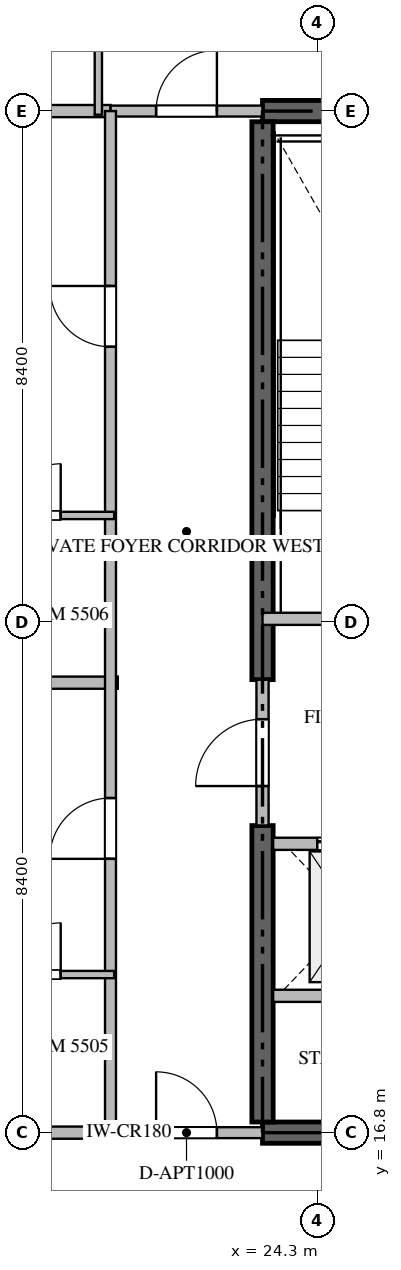
"""IFC4 building model, lengths in metres.
Left out: names, types, materials, properties, quantities, classifications, styles, units other than length and angle.
Written with IfcOpenShell. Run it as: python <this file> out.ifc"""

import sys

from ifc_helpers import new_model, si_unit, direction, frame, frame_2d, origin, place, context, subcontext, project, spatial, rectangle, extrude, source, transform, mapped, element, fill, save


model = new_model("IFC4")
c1 = context("Model", 3, precision=1e-05, world=origin(), true_north=direction((0.0, 1.0)))
c2 = subcontext(c1, "Body", "Model", "MODEL_VIEW")
j1 = project(units=[si_unit("LENGTHUNIT", "METRE"), si_unit("PLANEANGLEUNIT", "RADIAN")], contexts=[c1])
p1 = place(None, origin())
s1 = spatial("IfcSite", under=j1, at=p1, CompositionType="ELEMENT")
p2 = place(p1, origin())
s2 = spatial("IfcBuilding", under=s1, at=p2, CompositionType="ELEMENT")
p3 = place(p2, frame((0.0, 0.0, 222.0)))
s3 = spatial("IfcBuildingStorey", under=s2, at=p3, CompositionType="ELEMENT", Elevation=222.0)
for number, where, z_axis, x_axis in (
    (1, (23.4, 16.8, -0.26), (0.0, 0.0, 1.0), (1.0, 0.0, 0.0)),
    (2, (41.4, 33.6, -0.26), (0.0, 0.0, 1.0), (-1.0, 0.0, 0.0)),
):
    element("IfcWall", number, at=place(p3, frame(where, z_axis=z_axis, x_axis=x_axis)), inside=s3, PredefinedType="SHEAR", context=c2, shape_type="SweptSolid", body=[
        extrude(rectangle(XDim=18.0, YDim=0.35, at=frame_2d((9.0, 0.0))), origin(), (0.0, 0.0, 1.0), 3.848),
    ])
p4 = place(p3, frame((23.4, 16.975, -0.26), z_axis=(0.0, 0.0, 1.0), x_axis=(0.0, 1.0, 0.0)))
e3 = element("IfcWall", 3, at=p4, inside=s3, PredefinedType="SHEAR", context=c2, shape_type="SweptSolid", body=[
    extrude(rectangle(XDim=4.875, YDim=0.35, at=frame_2d((2.438, 0.0))), origin(), (0.0, 0.0, 1.0), 3.848),
])
p5 = place(p3, frame((23.4, 24.25, -0.26), z_axis=(0.0, 0.0, 1.0), x_axis=(0.0, 1.0, 0.0)))
e4 = element("IfcWall", 4, at=p5, inside=s3, PredefinedType="SHEAR", context=c2, shape_type="SweptSolid", body=[
    extrude(rectangle(XDim=9.175, YDim=0.35, at=frame_2d((4.587, 0.0))), origin(), (0.0, 0.0, 1.0), 3.848),
])
p6 = place(p3, frame((23.4, 25.25, 0.0), z_axis=(0.0, 0.0, 1.0), x_axis=(1.0, 0.0, 0.0)))
e5 = element("IfcWall", 5, at=p6, inside=s3, PredefinedType="STANDARD", context=c2, shape_type="SweptSolid", body=[
    extrude(rectangle(XDim=4.45, YDim=0.2, at=frame_2d((2.225, 0.0))), origin(), (0.0, 0.0, 1.0), 3.59),
])
p7 = place(p6, frame((1.65, 0.0, 0.0)))
e6 = element("IfcOpeningElement", 6, at=p7, cuts=e5, PredefinedType="OPENING", context=c2, shape_type="SweptSolid", body=[
    extrude(rectangle(XDim=1.1, YDim=2.15, at=frame_2d((0.55, 1.075))), frame((0.0, 0.11, 0.0), z_axis=(0.0, -1.0, 0.0), x_axis=(1.0, 0.0, 0.0)), (0.0, 0.0, 1.0), 0.22),
])
p8 = place(p3, frame((23.575, 21.55, 0.0), z_axis=(0.0, 0.0, 1.0), x_axis=(1.0, 0.0, 0.0)))
e7 = element("IfcWall", 7, at=p8, inside=s3, PredefinedType="STANDARD", context=c2, shape_type="SweptSolid", body=[
    extrude(rectangle(XDim=2.475, YDim=0.2, at=frame_2d((1.238, 0.0))), origin(), (0.0, 0.0, 1.0), 3.59),
])
p9 = place(p8, frame((0.725, 0.0, 0.0)))
e8 = element("IfcOpeningElement", 8, at=p9, cuts=e7, PredefinedType="OPENING", context=c2, shape_type="SweptSolid", body=[
    extrude(rectangle(XDim=1.2, YDim=2.2, at=frame_2d((0.6, 1.1))), frame((0.0, 0.11, 0.0), z_axis=(0.0, -1.0, 0.0), x_axis=(1.0, 0.0, 0.0)), (0.0, 0.0, 1.0), 0.22),
])
p10 = place(p3, frame((23.575, 19.05, 0.0), z_axis=(0.0, 0.0, 1.0), x_axis=(1.0, 0.0, 0.0)))
e9 = element("IfcWall", 9, at=p10, inside=s3, PredefinedType="STANDARD", context=c2, shape_type="SweptSolid", body=[
    extrude(rectangle(XDim=2.475, YDim=0.2, at=frame_2d((1.238, 0.0))), origin(), (0.0, 0.0, 1.0), 3.59),
])
p11 = place(p3, frame((23.4, 21.852, 0.0), z_axis=(0.0, 0.0, 1.0), x_axis=(0.0, 1.0, 0.0)))
e10 = element("IfcWall", 10, at=p11, inside=s3, PredefinedType="STANDARD", context=c2, shape_type="SweptSolid", body=[
    extrude(rectangle(XDim=2.396, YDim=0.2, at=frame_2d((1.198, 0.0))), origin(), (0.0, 0.0, 1.0), 3.59),
])
p12 = place(p11, frame((0.648, 0.0, 0.0)))
e11 = element("IfcOpeningElement", 11, at=p12, cuts=e10, PredefinedType="OPENING", context=c2, shape_type="SweptSolid", body=[
    extrude(rectangle(XDim=1.1, YDim=2.15, at=frame_2d((0.55, 1.075))), frame((0.0, 0.11, 0.0), z_axis=(0.0, -1.0, 0.0), x_axis=(1.0, 0.0, 0.0)), (0.0, 0.0, 1.0), 0.22),
])
p13 = place(p3, frame((7.482, 24.2, 0.0), z_axis=(0.0, 0.0, 1.0), x_axis=(1.0, 0.0, 0.0)))
e12 = element("IfcWall", 12, at=p13, inside=s3, PredefinedType="PARTITIONING", context=c2, shape_type="SweptSolid", body=[
    extrude(rectangle(XDim=13.538, YDim=0.2, at=frame_2d((6.769, 0.0))), origin(), (0.0, 0.0, 1.0), 3.59),
])
for number, where, z_axis, x_axis in (
    (13, (7.482, 16.8, 0.0), (0.0, 0.0, 1.0), (1.0, 0.0, 0.0)),
    (14, (7.482, 33.6, 0.0), (0.0, 0.0, 1.0), (1.0, 0.0, 0.0)),
):
    element("IfcWall", number, at=place(p3, frame(where, z_axis=z_axis, x_axis=x_axis)), inside=s3, PredefinedType="PARTITIONING", context=c2, shape_type="SweptSolid", body=[
        extrude(rectangle(XDim=13.418, YDim=0.2, at=frame_2d((6.709, 0.0))), origin(), (0.0, 0.0, 1.0), 3.59),
    ])
p14 = place(p3, frame((20.902, 16.8, 0.0), z_axis=(0.0, 0.0, 1.0), x_axis=(1.0, 0.0, 0.0)))
e15 = element("IfcWall", 15, at=p14, inside=s3, PredefinedType="PARTITIONING", context=c2, shape_type="SweptSolid", body=[
    extrude(rectangle(XDim=2.496, YDim=0.18, at=frame_2d((1.248, 0.0))), origin(), (0.0, 0.0, 1.0), 3.59),
])
p15 = place(p14, frame((0.748, 0.0, 0.0)))
e16 = element("IfcOpeningElement", 16, at=p15, cuts=e15, PredefinedType="OPENING", context=c2, shape_type="SweptSolid", body=[
    extrude(rectangle(XDim=1.0, YDim=2.15, at=frame_2d((0.5, 1.075))), frame((0.0, 0.1, 0.0), z_axis=(0.0, -1.0, 0.0), x_axis=(1.0, 0.0, 0.0)), (0.0, 0.0, 1.0), 0.2),
])
p16 = place(p3, frame((20.902, 33.6, 0.0), z_axis=(0.0, 0.0, 1.0), x_axis=(1.0, 0.0, 0.0)))
e17 = element("IfcWall", 17, at=p16, inside=s3, PredefinedType="PARTITIONING", context=c2, shape_type="SweptSolid", body=[
    extrude(rectangle(XDim=2.496, YDim=0.18, at=frame_2d((1.248, 0.0))), origin(), (0.0, 0.0, 1.0), 3.59),
])
p17 = place(p16, frame((0.748, 0.0, 0.0)))
e18 = element("IfcOpeningElement", 18, at=p17, cuts=e17, PredefinedType="OPENING", context=c2, shape_type="SweptSolid", body=[
    extrude(rectangle(XDim=1.0, YDim=2.15, at=frame_2d((0.5, 1.075))), frame((0.0, 0.1, 0.0), z_axis=(0.0, -1.0, 0.0), x_axis=(1.0, 0.0, 0.0)), (0.0, 0.0, 1.0), 0.2),
])
p18 = place(p3, frame((20.9, 16.8, 0.0), z_axis=(0.0, 0.0, 1.0), x_axis=(0.0, 1.0, 0.0)))
e19 = element("IfcWall", 19, at=p18, inside=s3, PredefinedType="PARTITIONING", context=c2, shape_type="SweptSolid", body=[
    extrude(rectangle(XDim=16.8, YDim=0.18, at=frame_2d((8.4, 0.0))), origin(), (0.0, 0.0, 1.0), 3.59),
])
p19 = place(p18, frame((4.503, 0.0, 0.0)))
e20 = element("IfcOpeningElement", 20, at=p19, cuts=e19, PredefinedType="OPENING", context=c2, shape_type="SweptSolid", body=[
    extrude(rectangle(XDim=1.0, YDim=2.15, at=frame_2d((0.5, 1.075))), frame((0.0, 0.1, 0.0), z_axis=(0.0, -1.0, 0.0), x_axis=(1.0, 0.0, 0.0)), (0.0, 0.0, 1.0), 0.2),
])
p20 = place(p18, frame((12.924, 0.0, 0.0)))
e21 = element("IfcOpeningElement", 21, at=p20, cuts=e19, PredefinedType="OPENING", context=c2, shape_type="SweptSolid", body=[
    extrude(rectangle(XDim=1.0, YDim=2.15, at=frame_2d((0.5, 1.075))), frame((0.0, 0.1, 0.0), z_axis=(0.0, -1.0, 0.0), x_axis=(1.0, 0.0, 0.0)), (0.0, 0.0, 1.0), 0.2),
])
p21 = place(p3, frame((20.7, 36.35, 0.0), z_axis=(0.0, 0.0, 1.0), x_axis=(0.0, -1.0, 0.0)))
e22 = element("IfcWall", 22, at=p21, inside=s3, PredefinedType="PARTITIONING", context=c2, shape_type="SweptSolid", body=[
    extrude(rectangle(XDim=2.81, YDim=0.12, at=frame_2d((1.405, 0.0))), origin(), (0.0, 0.0, 1.0), 3.59),
])
p22 = place(p3, frame((18.352, 19.4, 0.0), z_axis=(0.0, 0.0, 1.0), x_axis=(1.0, 0.0, 0.0)))
e23 = element("IfcWall", 23, at=p22, inside=s3, PredefinedType="PARTITIONING", context=c2, shape_type="SweptSolid", body=[
    extrude(rectangle(XDim=2.608, YDim=0.12, at=frame_2d((1.304, 0.0))), origin(), (0.0, 0.0, 1.0), 3.59),
])
p23 = place(p22, frame((0.879, 0.0, 0.0)))
e24 = element("IfcOpeningElement", 24, at=p23, cuts=e23, PredefinedType="OPENING", context=c2, shape_type="SweptSolid", body=[
    extrude(rectangle(XDim=0.85, YDim=2.1, at=frame_2d((0.425, 1.05))), frame((0.0, 0.07, 0.0), z_axis=(0.0, -1.0, 0.0), x_axis=(1.0, 0.0, 0.0)), (0.0, 0.0, 1.0), 0.14),
])
p24 = place(p3, frame((18.352, 26.95, 0.0), z_axis=(0.0, 0.0, 1.0), x_axis=(1.0, 0.0, 0.0)))
e25 = element("IfcWall", 25, at=p24, inside=s3, PredefinedType="PARTITIONING", context=c2, shape_type="SweptSolid", body=[
    extrude(rectangle(XDim=2.608, YDim=0.12, at=frame_2d((1.304, 0.0))), origin(), (0.0, 0.0, 1.0), 3.59),
])
p25 = place(p24, frame((0.879, 0.0, 0.0)))
e26 = element("IfcOpeningElement", 26, at=p25, cuts=e25, PredefinedType="OPENING", context=c2, shape_type="SweptSolid", body=[
    extrude(rectangle(XDim=0.85, YDim=2.1, at=frame_2d((0.425, 1.05))), frame((0.0, 0.07, 0.0), z_axis=(0.0, -1.0, 0.0), x_axis=(1.0, 0.0, 0.0)), (0.0, 0.0, 1.0), 0.14),
])
m1 = source(origin(), c2, "Body", "SweptSolid", [
    extrude(rectangle(XDim=1.2, YDim=2.2, at=frame_2d((0.6, 1.1))), frame((0.0, 0.025, 0.0), z_axis=(0.0, -1.0, 0.0), x_axis=(1.0, 0.0, 0.0)), (0.0, 0.0, 1.0), 0.05),
])
p26 = place(p9, origin())
e27 = element("IfcDoor", 27, at=p26, inside=s3, OperationType="DOUBLE_DOOR_SLIDING", PredefinedType="DOOR", context=c2, shape_type="MappedRepresentation", body=[
    mapped(m1, transform((0.0, 0.0, 0.0), scale=1.0)),
])
fill(e8, e27)
m2 = source(origin(), c2, "Body", "SweptSolid", [
    extrude(rectangle(XDim=1.1, YDim=2.15, at=frame_2d((0.55, 1.075))), frame((0.0, 0.025, 0.0), z_axis=(0.0, -1.0, 0.0), x_axis=(1.0, 0.0, 0.0)), (0.0, 0.0, 1.0), 0.05),
])
p27 = place(p12, origin())
e28 = element("IfcDoor", 28, at=p27, inside=s3, OperationType="SINGLE_SWING_LEFT", PredefinedType="DOOR", context=c2, shape_type="MappedRepresentation", body=[
    mapped(m2, transform((0.0, 0.0, 0.0), scale=1.0)),
])
fill(e11, e28)
m3 = source(origin(), c2, "Body", "SweptSolid", [
    extrude(rectangle(XDim=1.0, YDim=2.15, at=frame_2d((0.5, 1.075))), frame((0.0, 0.025, 0.0), z_axis=(0.0, -1.0, 0.0), x_axis=(1.0, 0.0, 0.0)), (0.0, 0.0, 1.0), 0.05),
])
p28 = place(p15, origin())
e29 = element("IfcDoor", 29, at=p28, inside=s3, OperationType="SINGLE_SWING_LEFT", PredefinedType="DOOR", context=c2, shape_type="MappedRepresentation", body=[
    mapped(m3, transform((0.0, 0.0, 0.0), scale=1.0)),
])
fill(e16, e29)
p29 = place(p17, origin())
e30 = element("IfcDoor", 30, at=p29, inside=s3, OperationType="SINGLE_SWING_RIGHT", PredefinedType="DOOR", context=c2, shape_type="MappedRepresentation", body=[
    mapped(m3, transform((0.0, 0.0, 0.0), scale=1.0)),
])
fill(e18, e30)
p30 = place(p19, origin())
e31 = element("IfcDoor", 31, at=p30, inside=s3, OperationType="SINGLE_SWING_LEFT", PredefinedType="DOOR", context=c2, shape_type="MappedRepresentation", body=[
    mapped(m3, transform((0.0, 0.0, 0.0), scale=1.0)),
])
fill(e20, e31)
p31 = place(p20, origin())
e32 = element("IfcDoor", 32, at=p31, inside=s3, OperationType="SINGLE_SWING_RIGHT", PredefinedType="DOOR", context=c2, shape_type="MappedRepresentation", body=[
    mapped(m3, transform((0.0, 0.0, 0.0), scale=1.0)),
])
fill(e21, e32)
m4 = source(origin(), c2, "Body", "SweptSolid", [
    extrude(rectangle(XDim=0.85, YDim=2.1, at=frame_2d((0.425, 1.05))), frame((0.0, 0.025, 0.0), z_axis=(0.0, -1.0, 0.0), x_axis=(1.0, 0.0, 0.0)), (0.0, 0.0, 1.0), 0.05),
])
p32 = place(p23, origin())
e33 = element("IfcDoor", 33, at=p32, inside=s3, OperationType="SINGLE_SWING_RIGHT", PredefinedType="DOOR", context=c2, shape_type="MappedRepresentation", body=[
    mapped(m4, transform((0.0, 0.0, 0.0), scale=1.0)),
])
fill(e24, e33)
p33 = place(p25, origin())
e34 = element("IfcDoor", 34, at=p33, inside=s3, OperationType="SINGLE_SWING_RIGHT", PredefinedType="DOOR", context=c2, shape_type="MappedRepresentation", body=[
    mapped(m4, transform((0.0, 0.0, 0.0), scale=1.0)),
])
fill(e26, e34)
save(model, sys.argv[1])
